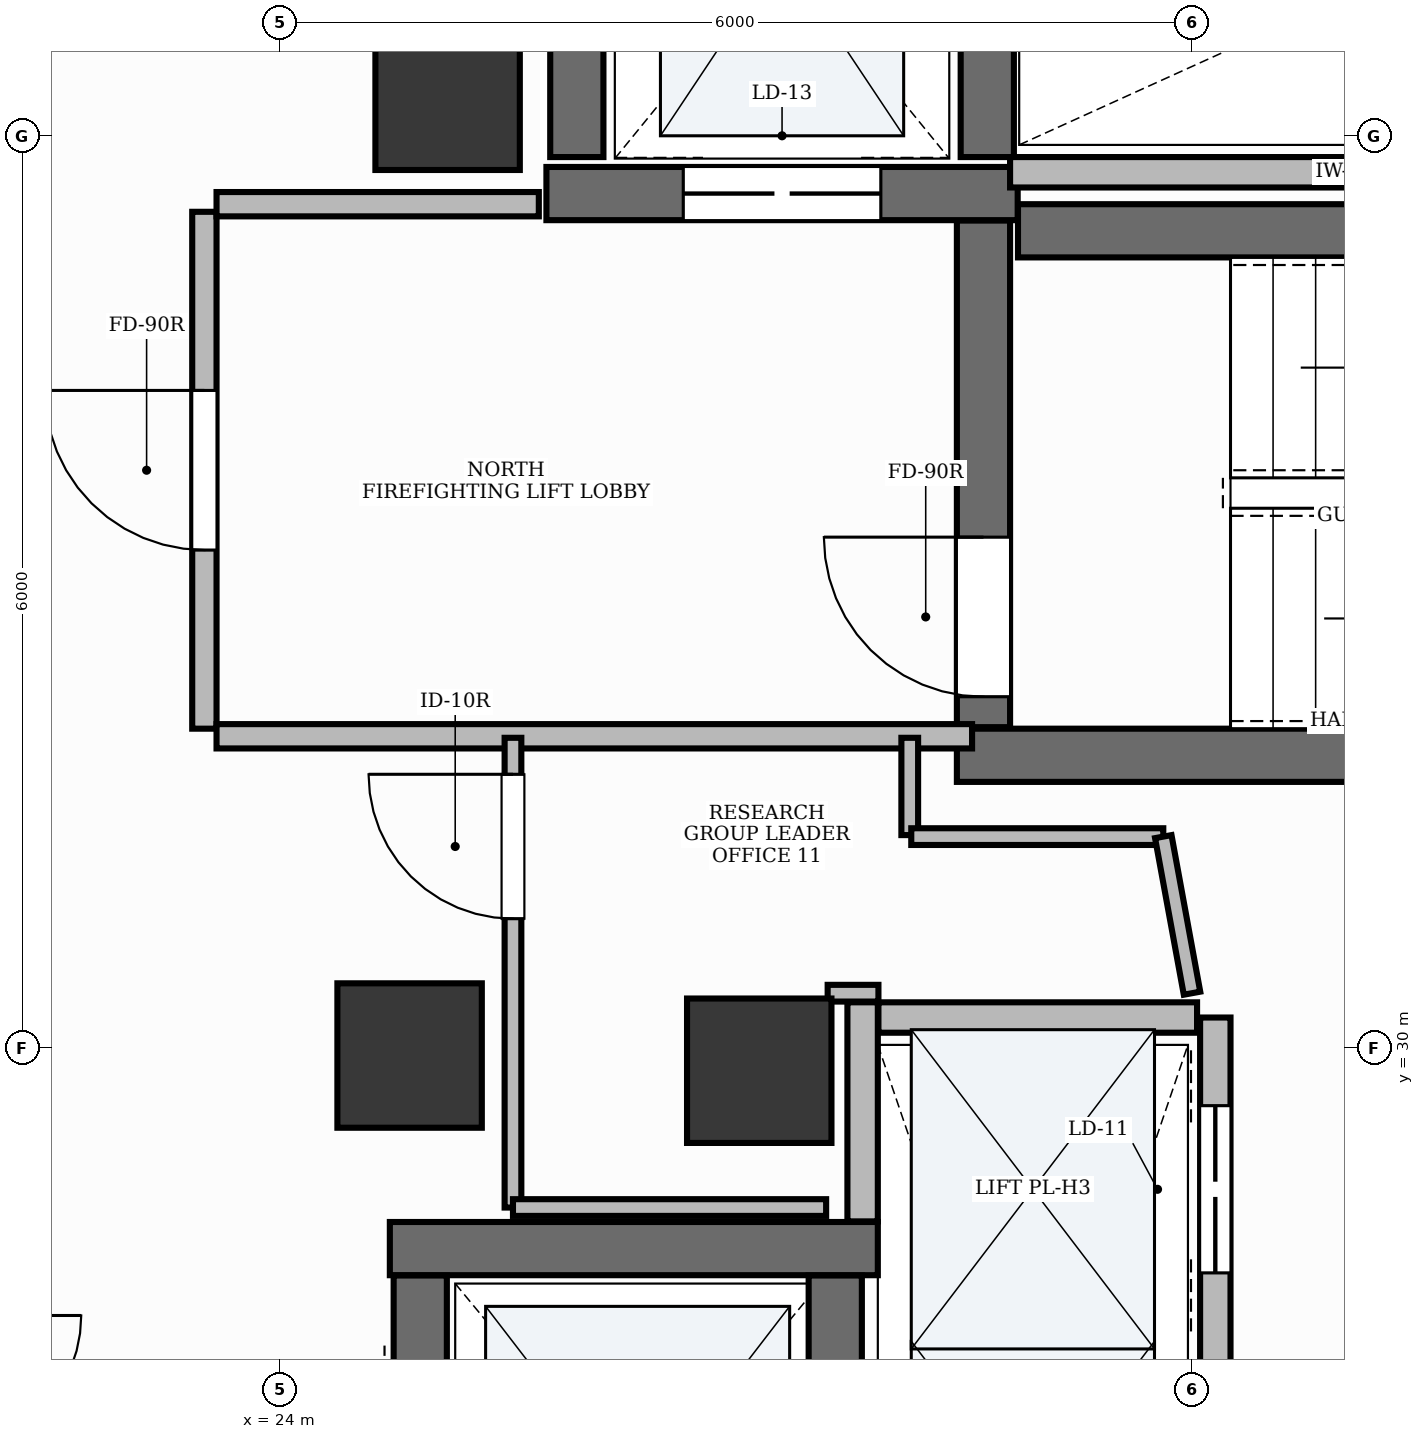
"""IFC4 building model, lengths in metres.
Left out: names, types, materials, properties, quantities, classifications, styles, units other than length and angle.
Written with IfcOpenShell. Run it as: python <this file> out.ifc"""

import sys

from ifc_helpers import new_model, si_unit, direction, frame, frame_2d, origin, origin_2d, place, context, subcontext, project, spatial, rectangle, extrude, element, fill, save


model = new_model("IFC4")
c1 = context("Model", 3, precision=1e-05, world=origin(), true_north=direction((0.0, 1.0)))
c2 = subcontext(c1, "Body", "Model", "MODEL_VIEW")
j1 = project(units=[si_unit("LENGTHUNIT", "METRE"), si_unit("PLANEANGLEUNIT", "RADIAN")], contexts=[c1])
p1 = place(None, origin())
s1 = spatial("IfcSite", under=j1, at=p1, CompositionType="ELEMENT")
p2 = place(p1, origin())
s2 = spatial("IfcBuilding", under=s1, at=p2, CompositionType="ELEMENT")
p3 = place(p2, frame((0.0, 0.0, 282.6)))
s3 = spatial("IfcBuildingStorey", under=s2, at=p3, CompositionType="ELEMENT", Elevation=282.6)
p4 = place(p3, frame((28.852, 35.375, 0.0), z_axis=(0.0, 0.0, 1.0), x_axis=(1.0, 0.0, 0.0)))
e1 = element("IfcWall", 1, at=p4, inside=s3, PredefinedType="SHEAR", context=c2, shape_type="SweptSolid", body=[
    extrude(rectangle(XDim=8.148, YDim=0.35, at=frame_2d((4.074, 0.0))), origin(), (0.0, 0.0, 1.0), 3.79),
])
p5 = place(p3, frame((28.45, 31.925, 0.0), z_axis=(0.0, 0.0, 1.0), x_axis=(1.0, 0.0, 0.0)))
e2 = element("IfcWall", 2, at=p5, inside=s3, PredefinedType="SHEAR", context=c2, shape_type="SweptSolid", body=[
    extrude(rectangle(XDim=8.55, YDim=0.35, at=frame_2d((4.275, 0.0))), origin(), (0.0, 0.0, 1.0), 3.79),
])
p6 = place(p3, frame((28.625, 32.11, 0.0), z_axis=(0.0, 0.0, 1.0), x_axis=(0.0, 1.0, 0.0)))
e3 = element("IfcWall", 3, at=p6, inside=s3, PredefinedType="SHEAR", context=c2, shape_type="SweptSolid", body=[
    extrude(rectangle(XDim=3.333, YDim=0.35, at=frame_2d((1.667, 0.0))), origin(), (0.0, 0.0, 1.0), 3.79),
])
p7 = place(p6, frame((0.2, 0.0, 0.0)))
e4 = element("IfcOpeningElement", 4, at=p7, cuts=e3, PredefinedType="OPENING", context=c2, shape_type="SweptSolid", body=[
    extrude(rectangle(XDim=1.05, YDim=2.15, at=frame_2d((0.525, 1.075))), frame((0.0, 0.19, 0.0), z_axis=(0.0, -1.0, 0.0), x_axis=(1.0, 0.0, 0.0)), (0.0, 0.0, 1.0), 0.38),
])
p8 = place(p3, frame((25.75, 35.62, 0.0), z_axis=(0.0, 0.0, 1.0), x_axis=(1.0, 0.0, 0.0)))
e5 = element("IfcWall", 5, at=p8, inside=s3, PredefinedType="SHEAR", context=c2, shape_type="SweptSolid", body=[
    extrude(rectangle(XDim=3.1, YDim=0.35, at=frame_2d((1.55, 0.0))), origin(), (0.0, 0.0, 1.0), 3.79),
])
p9 = place(p8, frame((0.9, 0.0, 0.0)))
e6 = element("IfcOpeningElement", 6, at=p9, cuts=e5, PredefinedType="OPENING", context=c2, shape_type="SweptSolid", body=[
    extrude(rectangle(XDim=1.3, YDim=2.2, at=frame_2d((0.65, 1.1))), frame((0.0, 0.19, 0.0), z_axis=(0.0, -1.0, 0.0), x_axis=(1.0, 0.0, 0.0)), (0.0, 0.0, 1.0), 0.38),
])
for number, where, z_axis, x_axis in (
    (7, (25.95, 35.86, 0.0), (0.0, 0.0, 1.0), (0.0, 1.0, 0.0)),
    (8, (28.65, 35.86, 0.0), (0.0, 0.0, 1.0), (0.0, 1.0, 0.0)),
):
    element("IfcWall", number, at=place(p3, frame(where, z_axis=z_axis, x_axis=x_axis)), inside=s3, PredefinedType="SHEAR", context=c2, shape_type="SweptSolid", body=[
        extrude(rectangle(XDim=2.7, YDim=0.35, at=frame_2d((1.35, 0.0))), origin(), (0.0, 0.0, 1.0), 3.79),
    ])
p10 = place(p3, frame((24.72, 28.68, 0.0), z_axis=(0.0, 0.0, 1.0), x_axis=(1.0, 0.0, 0.0)))
e9 = element("IfcWall", 9, at=p10, inside=s3, PredefinedType="SHEAR", context=c2, shape_type="SweptSolid", body=[
    extrude(rectangle(XDim=3.21, YDim=0.35, at=frame_2d((1.605, 0.0))), origin(), (0.0, 0.0, 1.0), 3.79),
])
p11 = place(p3, frame((24.92, 25.497, 0.0), z_axis=(0.0, 0.0, 1.0), x_axis=(0.0, 1.0, 0.0)))
e10 = element("IfcWall", 10, at=p11, inside=s3, PredefinedType="SHEAR", context=c2, shape_type="SweptSolid", body=[
    extrude(rectangle(XDim=3.006, YDim=0.35, at=frame_2d((1.503, 0.0))), origin(), (0.0, 0.0, 1.0), 3.79),
])
p12 = place(p11, frame((0.79, 0.0, 0.0)))
e11 = element("IfcOpeningElement", 11, at=p12, cuts=e10, PredefinedType="OPENING", context=c2, shape_type="SweptSolid", body=[
    extrude(rectangle(XDim=1.3, YDim=2.2, at=frame_2d((0.65, 1.1))), frame((0.0, 0.19, 0.0), z_axis=(0.0, -1.0, 0.0), x_axis=(1.0, 0.0, 0.0)), (0.0, 0.0, 1.0), 0.38),
])
p13 = place(p3, frame((27.65, 25.497, 0.0), z_axis=(0.0, 0.0, 1.0), x_axis=(0.0, 1.0, 0.0)))
e12 = element("IfcWall", 12, at=p13, inside=s3, PredefinedType="SHEAR", context=c2, shape_type="SweptSolid", body=[
    extrude(rectangle(XDim=3.006, YDim=0.35, at=frame_2d((1.503, 0.0))), origin(), (0.0, 0.0, 1.0), 3.79),
])
for number, where, z_axis, x_axis in (
    (13, (25.1, 36.25, -0.0), (0.0, 0.0, 1.0), (1.0, 0.0, 0.0)),
    (14, (24.85, 29.95, -0.0), (0.0, 0.0, 1.0), (1.0, 0.0, 0.0)),
    (15, (27.15, 29.85, -0.0), (0.0, 0.0, 1.0), (1.0, 0.0, 0.0)),
):
    element("IfcColumn", number, at=place(p3, frame(where, z_axis=z_axis, x_axis=x_axis)), inside=s3, PredefinedType="PILASTER", context=c2, shape_type="SweptSolid", body=[
        extrude(rectangle(XDim=0.95, YDim=0.95, at=origin_2d()), origin(), (0.0, 0.0, 1.0), 3.791),
    ])
p14 = place(p3, frame((27.83, 28.859, 0.0), z_axis=(0.0, 0.0, 1.0), x_axis=(0.0, 1.0, 0.0)))
e16 = element("IfcWall", 16, at=p14, inside=s3, PredefinedType="PARTITIONING", context=c2, shape_type="SweptSolid", body=[
    extrude(rectangle(XDim=1.441, YDim=0.2, at=frame_2d((0.721, 0.0))), origin(), (0.0, 0.0, 1.0), 2.8),
])
p15 = place(p3, frame((30.15, 23.85, 0.0), z_axis=(0.0, 0.0, 1.0), x_axis=(0.0, 1.0, 0.0)))
e17 = element("IfcWall", 17, at=p15, inside=s3, PredefinedType="PARTITIONING", context=c2, shape_type="SweptSolid", body=[
    extrude(rectangle(XDim=6.35, YDim=0.2, at=frame_2d((3.175, 0.0))), origin(), (0.0, 0.0, 1.0), 2.8),
])
p16 = place(p15, frame((0.58, 0.0, 0.0)))
e18 = element("IfcOpeningElement", 18, at=p16, cuts=e17, PredefinedType="OPENING", context=c2, shape_type="SweptSolid", body=[
    extrude(rectangle(XDim=1.1, YDim=2.2, at=frame_2d((0.55, 1.1))), frame((0.0, 0.115, 0.0), z_axis=(0.0, -1.0, 0.0), x_axis=(1.0, 0.0, 0.0)), (0.0, 0.0, 1.0), 0.23),
])
p17 = place(p15, frame((2.62, 0.0, 0.0)))
e19 = element("IfcOpeningElement", 19, at=p17, cuts=e17, PredefinedType="OPENING", context=c2, shape_type="SweptSolid", body=[
    extrude(rectangle(XDim=1.1, YDim=2.2, at=frame_2d((0.55, 1.1))), frame((0.0, 0.115, 0.0), z_axis=(0.0, -1.0, 0.0), x_axis=(1.0, 0.0, 0.0)), (0.0, 0.0, 1.0), 0.23),
])
p18 = place(p15, frame((4.67, 0.0, 0.0)))
e20 = element("IfcOpeningElement", 20, at=p18, cuts=e17, PredefinedType="OPENING", context=c2, shape_type="SweptSolid", body=[
    extrude(rectangle(XDim=1.1, YDim=2.2, at=frame_2d((0.55, 1.1))), frame((0.0, 0.115, 0.0), z_axis=(0.0, -1.0, 0.0), x_axis=(1.0, 0.0, 0.0)), (0.0, 0.0, 1.0), 0.23),
])
p19 = place(p3, frame((27.934, 30.2, 0.0), z_axis=(0.0, 0.0, 1.0), x_axis=(1.0, 0.0, 0.0)))
e21 = element("IfcWall", 21, at=p19, inside=s3, PredefinedType="PARTITIONING", context=c2, shape_type="SweptSolid", body=[
    extrude(rectangle(XDim=2.096, YDim=0.2, at=frame_2d((1.048, 0.0))), origin(), (0.0, 0.0, 1.0), 2.8),
])
p20 = place(p3, frame((28.8, 35.76, 0.0), z_axis=(0.0, 0.0, 1.0), x_axis=(1.0, 0.0, 0.0)))
e22 = element("IfcWall", 22, at=p20, inside=s3, PredefinedType="PARTITIONING", context=c2, shape_type="SweptSolid", body=[
    extrude(rectangle(XDim=4.57, YDim=0.2, at=frame_2d((2.285, 0.0))), origin(), (0.0, 0.0, 1.0), 2.8),
])
p21 = place(p3, frame((23.5, 32.1, 0.0), z_axis=(0.0, 0.0, 1.0), x_axis=(0.0, 1.0, 0.0)))
e23 = element("IfcWall", 23, at=p21, inside=s3, PredefinedType="PARTITIONING", context=c2, shape_type="SweptSolid", body=[
    extrude(rectangle(XDim=3.4, YDim=0.16, at=frame_2d((1.7, 0.0))), origin(), (0.0, 0.0, 1.0), 2.8),
])
p22 = place(p21, frame((1.175, 0.0, 0.0)))
e24 = element("IfcOpeningElement", 24, at=p22, cuts=e23, PredefinedType="OPENING", context=c2, shape_type="SweptSolid", body=[
    extrude(rectangle(XDim=1.05, YDim=2.15, at=frame_2d((0.525, 1.075))), frame((0.0, 0.095, 0.0), z_axis=(0.0, -1.0, 0.0), x_axis=(1.0, 0.0, 0.0)), (0.0, 0.0, 1.0), 0.19),
])
p23 = place(p3, frame((23.58, 32.05, 0.0), z_axis=(0.0, 0.0, 1.0), x_axis=(1.0, 0.0, 0.0)))
e25 = element("IfcWall", 25, at=p23, inside=s3, PredefinedType="PARTITIONING", context=c2, shape_type="SweptSolid", body=[
    extrude(rectangle(XDim=4.97, YDim=0.16, at=frame_2d((2.485, 0.0))), origin(), (0.0, 0.0, 1.0), 2.8),
])
p24 = place(p3, frame((23.58, 35.55, 0.0), z_axis=(0.0, 0.0, 1.0), x_axis=(1.0, 0.0, 0.0)))
e26 = element("IfcWall", 26, at=p24, inside=s3, PredefinedType="PARTITIONING", context=c2, shape_type="SweptSolid", body=[
    extrude(rectangle(XDim=2.12, YDim=0.16, at=frame_2d((1.06, 0.0))), origin(), (0.0, 0.0, 1.0), 2.8),
])
p25 = place(p3, frame((25.53, 28.95, 0.0), z_axis=(0.0, 0.0, 1.0), x_axis=(0.0, 1.0, 0.0)))
e27 = element("IfcWall", 27, at=p25, inside=s3, PredefinedType="MOVABLE", context=c2, shape_type="SweptSolid", body=[
    extrude(rectangle(XDim=3.09, YDim=0.11, at=frame_2d((1.545, 0.0))), origin(), (0.0, 0.0, 1.0), 2.8),
])
p26 = place(p25, frame((1.9, 0.0, 0.0)))
e28 = element("IfcOpeningElement", 28, at=p26, cuts=e27, PredefinedType="OPENING", context=c2, shape_type="SweptSolid", body=[
    extrude(rectangle(XDim=0.95, YDim=2.15, at=frame_2d((0.475, 1.075))), frame((0.0, 0.07, 0.0), z_axis=(0.0, -1.0, 0.0), x_axis=(1.0, 0.0, 0.0)), (0.0, 0.0, 1.0), 0.14),
])
p27 = place(p3, frame((27.934, 30.36, 0.0), z_axis=(0.0, 0.0, 1.0), x_axis=(-1.0, 0.0, 0.0)))
e29 = element("IfcWall", 29, at=p27, inside=s3, PredefinedType="MOVABLE", context=c2, shape_type="SweptSolid", body=[
    extrude(rectangle(XDim=0.334, YDim=0.11, at=frame_2d((0.167, 0.0))), origin(), (0.0, 0.0, 1.0), 2.8),
])
p28 = place(p3, frame((27.59, 28.95, 0.0), z_axis=(0.0, 0.0, 1.0), x_axis=(-1.0, 0.0, 0.0)))
e30 = element("IfcWall", 30, at=p28, inside=s3, PredefinedType="MOVABLE", context=c2, shape_type="SweptSolid", body=[
    extrude(rectangle(XDim=2.06, YDim=0.11, at=frame_2d((1.03, 0.0))), origin(), (0.0, 0.0, 1.0), 2.8),
])
p29 = place(p3, frame((28.14, 32.04, 0.0), z_axis=(0.0, 0.0, 1.0), x_axis=(0.0, -1.0, 0.0)))
e31 = element("IfcWall", 31, at=p29, inside=s3, PredefinedType="MOVABLE", context=c2, shape_type="SweptSolid", body=[
    extrude(rectangle(XDim=0.64, YDim=0.11, at=frame_2d((0.32, 0.0))), origin(), (0.0, 0.0, 1.0), 2.8),
])
p30 = place(p3, frame((28.15, 31.39, 0.0), z_axis=(0.0, 0.0, 1.0), x_axis=(1.0, 0.0, 0.0)))
e32 = element("IfcWall", 32, at=p30, inside=s3, PredefinedType="MOVABLE", context=c2, shape_type="SweptSolid", body=[
    extrude(rectangle(XDim=1.658, YDim=0.11, at=frame_2d((0.829, 0.0))), origin(), (0.0, 0.0, 1.0), 2.8),
])
p31 = place(p3, frame((29.808, 31.39, 0.0), z_axis=(0.0, 0.0, 1.0), x_axis=(0.180485788632, -0.983577592314, 0.0)))
e33 = element("IfcWall", 33, at=p31, inside=s3, PredefinedType="MOVABLE", context=c2, shape_type="SweptSolid", body=[
    extrude(rectangle(XDim=1.047, YDim=0.11, at=frame_2d((0.523, 0.0))), origin(), (0.0, 0.0, 1.0), 2.8),
])
p32 = place(p7, origin())
e34 = element("IfcDoor", 34, at=p32, inside=s3, OperationType="SINGLE_SWING_RIGHT", PredefinedType="DOOR", context=c2, shape_type="SweptSolid", body=[
    extrude(rectangle(XDim=1.05, YDim=2.15, at=frame_2d((0.525, 1.075))), frame((0.0, 0.025, 0.0), z_axis=(0.0, -1.0, 0.0), x_axis=(1.0, 0.0, 0.0)), (0.0, 0.0, 1.0), 0.05),
])
fill(e4, e34)
p33 = place(p18, origin())
e35 = element("IfcDoor", 35, at=p33, inside=s3, OperationType="DOUBLE_DOOR_SLIDING", PredefinedType="DOOR", context=c2, shape_type="SweptSolid", body=[
    extrude(rectangle(XDim=1.1, YDim=2.2, at=frame_2d((0.55, 1.1))), frame((0.0, 0.025, 0.0), z_axis=(0.0, -1.0, 0.0), x_axis=(1.0, 0.0, 0.0)), (0.0, 0.0, 1.0), 0.05),
])
fill(e20, e35)
p34 = place(p9, origin())
e36 = element("IfcDoor", 36, at=p34, inside=s3, OperationType="DOUBLE_DOOR_SLIDING", PredefinedType="DOOR", context=c2, shape_type="SweptSolid", body=[
    extrude(rectangle(XDim=1.3, YDim=2.2, at=frame_2d((0.65, 1.1))), frame((0.0, 0.025, 0.0), z_axis=(0.0, -1.0, 0.0), x_axis=(1.0, 0.0, 0.0)), (0.0, 0.0, 1.0), 0.05),
])
fill(e6, e36)
p35 = place(p22, origin())
e37 = element("IfcDoor", 37, at=p35, inside=s3, OperationType="SINGLE_SWING_RIGHT", PredefinedType="DOOR", context=c2, shape_type="SweptSolid", body=[
    extrude(rectangle(XDim=1.05, YDim=2.15, at=frame_2d((0.525, 1.075))), frame((0.0, 0.025, 0.0), z_axis=(0.0, -1.0, 0.0), x_axis=(1.0, 0.0, 0.0)), (0.0, 0.0, 1.0), 0.05),
])
fill(e24, e37)
p36 = place(p26, origin())
e38 = element("IfcDoor", 38, at=p36, inside=s3, OperationType="SINGLE_SWING_RIGHT", PredefinedType="DOOR", context=c2, shape_type="SweptSolid", body=[
    extrude(rectangle(XDim=0.95, YDim=2.15, at=frame_2d((0.475, 1.075))), frame((0.0, 0.025, 0.0), z_axis=(0.0, -1.0, 0.0), x_axis=(1.0, 0.0, 0.0)), (0.0, 0.0, 1.0), 0.05),
])
fill(e28, e38)
save(model, sys.argv[1])
